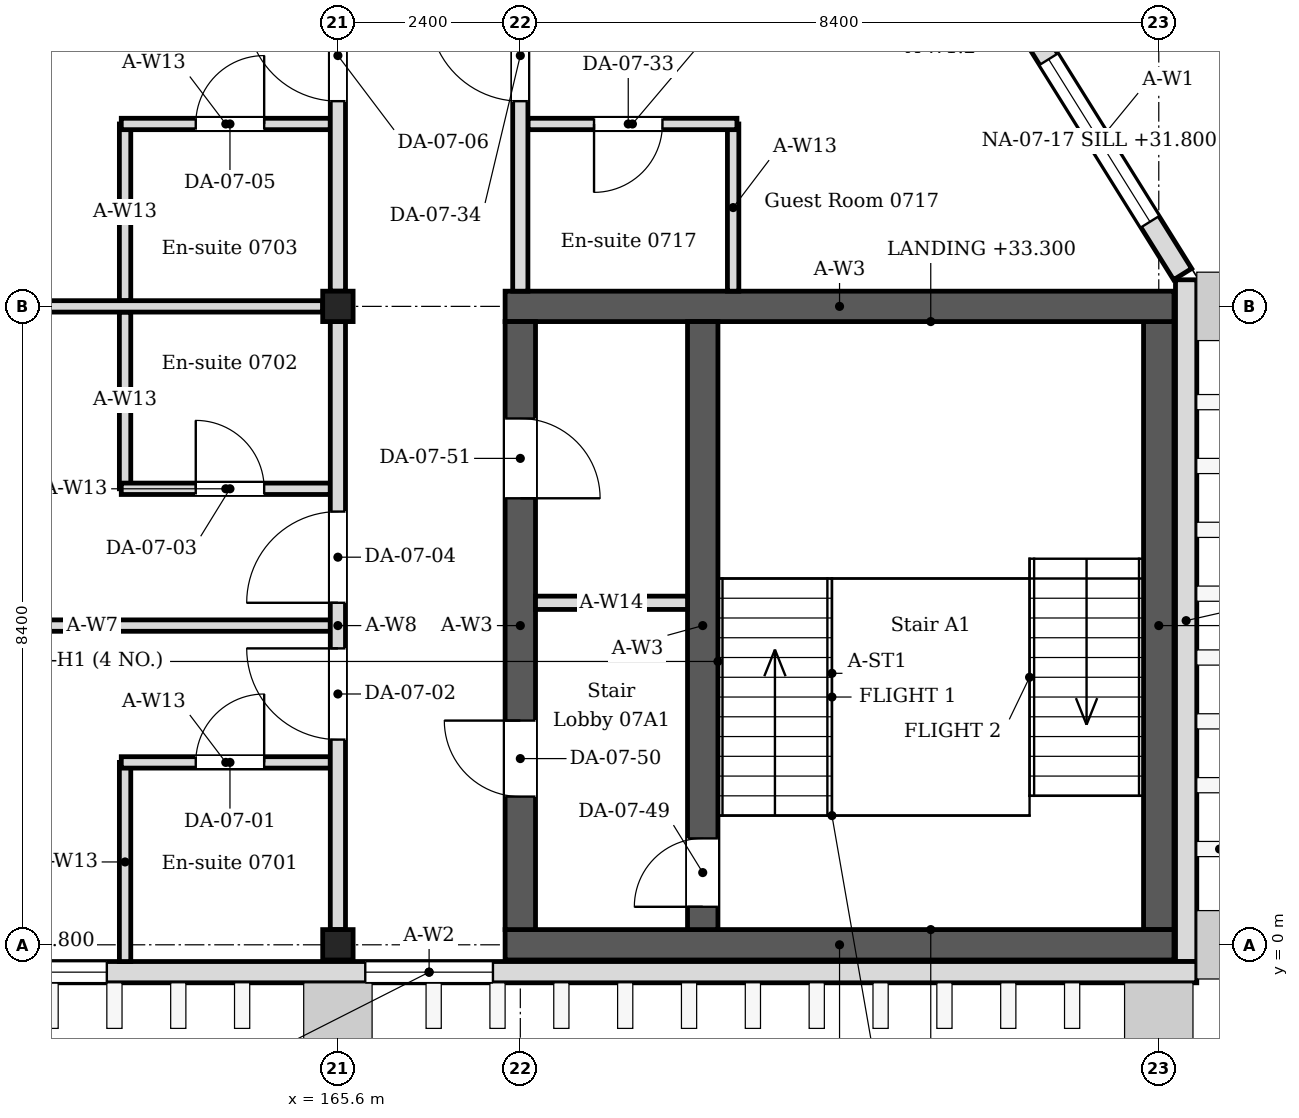
"""IFC4 building model, lengths in metres.
Left out: names, types, materials, properties, quantities, classifications, styles, units other than length and angle.
Written with IfcOpenShell. Run it as: python <this file> out.ifc"""

import sys

from ifc_helpers import new_model, si_unit, direction, frame, frame_2d, origin, origin_2d, place, context, subcontext, project, spatial, rectangle, i_section, extrude, element, fill, save


model = new_model("IFC4")
c1 = context("Model", 3, precision=1e-05, world=origin(), true_north=direction((0.0, 1.0)))
c2 = subcontext(c1, "Body", "Model", "MODEL_VIEW")
j1 = project(units=[si_unit("LENGTHUNIT", "METRE"), si_unit("PLANEANGLEUNIT", "RADIAN")], contexts=[c1])
p1 = place(None, origin())
s1 = spatial("IfcSite", under=j1, at=p1, CompositionType="ELEMENT")
p2 = place(p1, origin())
s2 = spatial("IfcBuilding", under=s1, at=p2, CompositionType="ELEMENT")
p3 = place(p2, frame((0.0, 0.0, 31.2)))
s3 = spatial("IfcBuildingStorey", under=s2, at=p3, CompositionType="ELEMENT", Elevation=31.2)
for number, where, z_axis, x_axis in (
    (1, (165.6, 0.0, 0.0), (0.0, 0.0, 1.0), (1.0, 0.0, 0.0)),
    (2, (165.6, 8.4, 0.0), (0.0, 0.0, 1.0), (1.0, 0.0, 0.0)),
):
    element("IfcColumn", number, at=place(p3, frame(where, z_axis=z_axis, x_axis=x_axis)), inside=s3, PredefinedType="COLUMN", context=c2, shape_type="SweptSolid", body=[
        extrude(i_section(OverallWidth=0.4, OverallDepth=0.4, WebThickness=0.013, FlangeThickness=0.021, FilletRadius=0.022, at=origin_2d()), origin(), (0.0, 0.0, 1.0), 4.2),
    ])
for number, where, z_axis, x_axis in (
    (3, (167.8, 0.0, 0.0), (0.0, 0.0, 1.0), (1.0, 0.0, 0.0)),
    (4, (167.8, 8.4, 0.0), (0.0, 0.0, 1.0), (1.0, 0.0, 0.0)),
):
    element("IfcWall", number, at=place(p3, frame(where, z_axis=z_axis, x_axis=x_axis)), inside=s3, PredefinedType="SOLIDWALL", context=c2, shape_type="SweptSolid", body=[
        extrude(rectangle(XDim=8.8, YDim=0.4, at=frame_2d((4.4, 0.0))), origin(), (0.0, 0.0, 1.0), 4.05),
    ])
p4 = place(p3, frame((168.0, 0.2, 0.0), z_axis=(0.0, 0.0, 1.0), x_axis=(0.0, 1.0, 0.0)))
e5 = element("IfcWall", 5, at=p4, inside=s3, PredefinedType="SOLIDWALL", context=c2, shape_type="SweptSolid", body=[
    extrude(rectangle(XDim=8.0, YDim=0.4, at=frame_2d((4.0, 0.0))), origin(), (0.0, 0.0, 1.0), 4.05),
])
p5 = place(p4, frame((1.75, 0.0, 0.0)))
e6 = element("IfcOpeningElement", 6, at=p5, cuts=e5, PredefinedType="OPENING", context=c2, shape_type="SweptSolid", body=[
    extrude(rectangle(XDim=1.0, YDim=2.1, at=frame_2d((0.5, 1.05))), frame((0.0, 0.21, 0.0), z_axis=(0.0, -1.0, 0.0), x_axis=(1.0, 0.0, 0.0)), (0.0, 0.0, 1.0), 0.42),
])
p6 = place(p4, frame((5.675, 0.0, 0.0)))
e7 = element("IfcOpeningElement", 7, at=p6, cuts=e5, PredefinedType="OPENING", context=c2, shape_type="SweptSolid", body=[
    extrude(rectangle(XDim=1.05, YDim=2.1, at=frame_2d((0.525, 1.05))), frame((0.0, 0.21, 0.0), z_axis=(0.0, -1.0, 0.0), x_axis=(1.0, 0.0, 0.0)), (0.0, 0.0, 1.0), 0.42),
])
p7 = place(p3, frame((176.4, 0.2, 0.0), z_axis=(0.0, 0.0, 1.0), x_axis=(0.0, 1.0, 0.0)))
e8 = element("IfcWall", 8, at=p7, inside=s3, PredefinedType="SOLIDWALL", context=c2, shape_type="SweptSolid", body=[
    extrude(rectangle(XDim=8.0, YDim=0.4, at=frame_2d((4.0, 0.0))), origin(), (0.0, 0.0, 1.0), 4.05),
])
p8 = place(p3, frame((176.76, -0.22, 0.0), z_axis=(0.0, 0.0, 1.0), x_axis=(0.0, 1.0, 0.0)))
e9 = element("IfcWall", 9, at=p8, inside=s3, PredefinedType="SOLIDWALL", context=c2, shape_type="SweptSolid", body=[
    extrude(rectangle(XDim=8.97, YDim=0.28, at=frame_2d((4.485, 0.0))), origin(), (0.0, 0.0, 1.0), 4.05),
])
p9 = place(p3, frame((176.714, 8.824, 0.0), z_axis=(0.0, 0.0, 1.0), x_axis=(-0.529018946142, 0.848610013271, 0.0)))
e10 = element("IfcWall", 10, at=p9, inside=s3, PredefinedType="SOLIDWALL", context=c2, shape_type="SweptSolid", body=[
    extrude(rectangle(XDim=4.144, YDim=0.28, at=frame_2d((2.072, 0.0))), origin(), (0.0, 0.0, 1.0), 4.05),
])
p10 = place(p9, frame((0.812, 0.0, 0.6)))
e11 = element("IfcOpeningElement", 11, at=p10, cuts=e10, PredefinedType="OPENING", context=c2, shape_type="SweptSolid", body=[
    extrude(rectangle(XDim=2.52, YDim=2.4, at=frame_2d((1.26, 1.2))), frame((0.0, 0.15, 0.0), z_axis=(0.0, -1.0, 0.0), x_axis=(1.0, 0.0, 0.0)), (0.0, 0.0, 1.0), 0.3),
])
p11 = place(p3, frame((156.7, -0.36, 0.0), z_axis=(0.0, 0.0, 1.0), x_axis=(1.0, 0.0, 0.0)))
e12 = element("IfcWall", 12, at=p11, inside=s3, PredefinedType="SOLIDWALL", context=c2, shape_type="SweptSolid", body=[
    extrude(rectangle(XDim=20.2, YDim=0.28, at=frame_2d((10.1, 0.0))), origin(), (0.0, 0.0, 1.0), 4.05),
])
p12 = place(p11, frame((9.26, 0.0, 0.6)))
e13 = element("IfcOpeningElement", 13, at=p12, cuts=e12, PredefinedType="OPENING", context=c2, shape_type="SweptSolid", body=[
    extrude(rectangle(XDim=1.68, YDim=2.4, at=frame_2d((0.84, 1.2))), frame((0.0, 0.15, 0.0), z_axis=(0.0, -1.0, 0.0), x_axis=(1.0, 0.0, 0.0)), (0.0, 0.0, 1.0), 0.3),
])
p13 = place(p11, frame((3.34, 0.0, 0.6)))
e14 = element("IfcOpeningElement", 14, at=p13, cuts=e12, PredefinedType="OPENING", context=c2, shape_type="SweptSolid", body=[
    extrude(rectangle(XDim=2.52, YDim=2.4, at=frame_2d((1.26, 1.2))), frame((0.0, 0.15, 0.0), z_axis=(0.0, -1.0, 0.0), x_axis=(1.0, 0.0, 0.0)), (0.0, 0.0, 1.0), 0.3),
])
p14 = place(p3, frame((162.8, -0.22, 0.0), z_axis=(0.0, 0.0, 1.0), x_axis=(0.0, 1.0, 0.0)))
e15 = element("IfcWall", 15, at=p14, inside=s3, PredefinedType="PARTITIONING", context=c2, shape_type="SweptSolid", body=[
    extrude(rectangle(XDim=2.62, YDim=0.15, at=frame_2d((1.31, 0.0))), origin(), (0.0, 0.0, 1.0), 4.05),
])
p15 = place(p3, frame((162.75, 2.4, 0.0), z_axis=(0.0, 0.0, 1.0), x_axis=(1.0, 0.0, 0.0)))
e16 = element("IfcWall", 16, at=p15, inside=s3, PredefinedType="PARTITIONING", context=c2, shape_type="SweptSolid", body=[
    extrude(rectangle(XDim=2.75, YDim=0.15, at=frame_2d((1.375, 0.0))), origin(), (0.0, 0.0, 1.0), 4.05),
])
p16 = place(p15, frame((0.98, 0.0, 0.0)))
e17 = element("IfcOpeningElement", 17, at=p16, cuts=e16, PredefinedType="OPENING", context=c2, shape_type="SweptSolid", body=[
    extrude(rectangle(XDim=0.9, YDim=2.1, at=frame_2d((0.45, 1.05))), frame((0.0, 0.085, 0.0), z_axis=(0.0, -1.0, 0.0), x_axis=(1.0, 0.0, 0.0)), (0.0, 0.0, 1.0), 0.17),
])
p17 = place(p3, frame((162.8, 6.0, 0.0), z_axis=(0.0, 0.0, 1.0), x_axis=(0.0, 1.0, 0.0)))
e18 = element("IfcWall", 18, at=p17, inside=s3, PredefinedType="PARTITIONING", context=c2, shape_type="SweptSolid", body=[
    extrude(rectangle(XDim=2.325, YDim=0.15, at=frame_2d((1.163, 0.0))), origin(), (0.0, 0.0, 1.0), 4.05),
])
p18 = place(p3, frame((162.75, 6.0, 0.0), z_axis=(0.0, 0.0, 1.0), x_axis=(1.0, 0.0, 0.0)))
e19 = element("IfcWall", 19, at=p18, inside=s3, PredefinedType="PARTITIONING", context=c2, shape_type="SweptSolid", body=[
    extrude(rectangle(XDim=2.75, YDim=0.15, at=frame_2d((1.375, 0.0))), origin(), (0.0, 0.0, 1.0), 4.05),
])
p19 = place(p18, frame((0.98, 0.0, 0.0)))
e20 = element("IfcOpeningElement", 20, at=p19, cuts=e19, PredefinedType="OPENING", context=c2, shape_type="SweptSolid", body=[
    extrude(rectangle(XDim=0.9, YDim=2.1, at=frame_2d((0.45, 1.05))), frame((0.0, 0.085, 0.0), z_axis=(0.0, -1.0, 0.0), x_axis=(1.0, 0.0, 0.0)), (0.0, 0.0, 1.0), 0.17),
])
p20 = place(p3, frame((162.8, 8.475, 0.0), z_axis=(0.0, 0.0, 1.0), x_axis=(0.0, 1.0, 0.0)))
e21 = element("IfcWall", 21, at=p20, inside=s3, PredefinedType="PARTITIONING", context=c2, shape_type="SweptSolid", body=[
    extrude(rectangle(XDim=2.325, YDim=0.15, at=frame_2d((1.163, 0.0))), origin(), (0.0, 0.0, 1.0), 4.05),
])
p21 = place(p3, frame((162.75, 10.8, 0.0), z_axis=(0.0, 0.0, 1.0), x_axis=(1.0, 0.0, 0.0)))
e22 = element("IfcWall", 22, at=p21, inside=s3, PredefinedType="PARTITIONING", context=c2, shape_type="SweptSolid", body=[
    extrude(rectangle(XDim=2.75, YDim=0.15, at=frame_2d((1.375, 0.0))), origin(), (0.0, 0.0, 1.0), 4.05),
])
p22 = place(p21, frame((0.98, 0.0, 0.0)))
e23 = element("IfcOpeningElement", 23, at=p22, cuts=e22, PredefinedType="OPENING", context=c2, shape_type="SweptSolid", body=[
    extrude(rectangle(XDim=0.9, YDim=2.1, at=frame_2d((0.45, 1.05))), frame((0.0, 0.085, 0.0), z_axis=(0.0, -1.0, 0.0), x_axis=(1.0, 0.0, 0.0)), (0.0, 0.0, 1.0), 0.17),
])
p23 = place(p3, frame((170.8, 8.6, 0.0), z_axis=(0.0, 0.0, 1.0), x_axis=(0.0, 1.0, 0.0)))
e24 = element("IfcWall", 24, at=p23, inside=s3, PredefinedType="PARTITIONING", context=c2, shape_type="SweptSolid", body=[
    extrude(rectangle(XDim=2.2, YDim=0.15, at=frame_2d((1.1, 0.0))), origin(), (0.0, 0.0, 1.0), 4.05),
])
p24 = place(p3, frame((170.85, 10.8, 0.0), z_axis=(0.0, 0.0, 1.0), x_axis=(-1.0, 0.0, 0.0)))
e25 = element("IfcWall", 25, at=p24, inside=s3, PredefinedType="PARTITIONING", context=c2, shape_type="SweptSolid", body=[
    extrude(rectangle(XDim=2.75, YDim=0.15, at=frame_2d((1.375, 0.0))), origin(), (0.0, 0.0, 1.0), 4.05),
])
p25 = place(p24, frame((0.98, 0.0, 0.0)))
e26 = element("IfcOpeningElement", 26, at=p25, cuts=e25, PredefinedType="OPENING", context=c2, shape_type="SweptSolid", body=[
    extrude(rectangle(XDim=0.9, YDim=2.1, at=frame_2d((0.45, 1.05))), frame((0.0, 0.085, 0.0), z_axis=(0.0, -1.0, 0.0), x_axis=(1.0, 0.0, 0.0)), (0.0, 0.0, 1.0), 0.17),
])
p26 = place(p3, frame((157.4, 8.4, 0.0), z_axis=(0.0, 0.0, 1.0), x_axis=(1.0, 0.0, 0.0)))
e27 = element("IfcWall", 27, at=p26, inside=s3, PredefinedType="PARTITIONING", context=c2, shape_type="SweptSolid", body=[
    extrude(rectangle(XDim=8.0, YDim=0.15, at=frame_2d((4.0, 0.0))), origin(), (0.0, 0.0, 1.0), 3.604),
])
p27 = place(p3, frame((159.24, 4.2, 0.0), z_axis=(0.0, 0.0, 1.0), x_axis=(1.0, 0.0, 0.0)))
e28 = element("IfcWall", 28, at=p27, inside=s3, PredefinedType="PARTITIONING", context=c2, shape_type="SweptSolid", body=[
    extrude(rectangle(XDim=6.26, YDim=0.15, at=frame_2d((3.13, 0.0))), origin(), (0.0, 0.0, 1.0), 3.604),
])
p28 = place(p3, frame((165.6, 0.2, 0.0), z_axis=(0.0, 0.0, 1.0), x_axis=(0.0, 1.0, 0.0)))
e29 = element("IfcWall", 29, at=p28, inside=s3, PredefinedType="PARTITIONING", context=c2, shape_type="SweptSolid", body=[
    extrude(rectangle(XDim=8.0, YDim=0.2, at=frame_2d((4.0, 0.0))), origin(), (0.0, 0.0, 1.0), 3.45),
])
p29 = place(p28, frame((2.5, 0.0, 0.0)))
e30 = element("IfcOpeningElement", 30, at=p29, cuts=e29, PredefinedType="OPENING", context=c2, shape_type="SweptSolid", body=[
    extrude(rectangle(XDim=1.2, YDim=2.1, at=frame_2d((0.6, 1.05))), frame((0.0, 0.11, 0.0), z_axis=(0.0, -1.0, 0.0), x_axis=(1.0, 0.0, 0.0)), (0.0, 0.0, 1.0), 0.22),
])
p30 = place(p28, frame((4.3, 0.0, 0.0)))
e31 = element("IfcOpeningElement", 31, at=p30, cuts=e29, PredefinedType="OPENING", context=c2, shape_type="SweptSolid", body=[
    extrude(rectangle(XDim=1.2, YDim=2.1, at=frame_2d((0.6, 1.05))), frame((0.0, 0.11, 0.0), z_axis=(0.0, -1.0, 0.0), x_axis=(1.0, 0.0, 0.0)), (0.0, 0.0, 1.0), 0.22),
])
p31 = place(p3, frame((165.6, 8.6, 0.0), z_axis=(0.0, 0.0, 1.0), x_axis=(0.0, 1.0, 0.0)))
e32 = element("IfcWall", 32, at=p31, inside=s3, PredefinedType="PARTITIONING", context=c2, shape_type="SweptSolid", body=[
    extrude(rectangle(XDim=8.0, YDim=0.2, at=frame_2d((4.0, 0.0))), origin(), (0.0, 0.0, 1.0), 3.45),
])
p32 = place(p31, frame((2.5, 0.0, 0.0)))
e33 = element("IfcOpeningElement", 33, at=p32, cuts=e32, PredefinedType="OPENING", context=c2, shape_type="SweptSolid", body=[
    extrude(rectangle(XDim=1.2, YDim=2.1, at=frame_2d((0.6, 1.05))), frame((0.0, 0.11, 0.0), z_axis=(0.0, -1.0, 0.0), x_axis=(1.0, 0.0, 0.0)), (0.0, 0.0, 1.0), 0.22),
])
p33 = place(p31, frame((4.3, 0.0, 0.0)))
e34 = element("IfcOpeningElement", 34, at=p33, cuts=e32, PredefinedType="OPENING", context=c2, shape_type="SweptSolid", body=[
    extrude(rectangle(XDim=1.2, YDim=2.1, at=frame_2d((0.6, 1.05))), frame((0.0, 0.11, 0.0), z_axis=(0.0, -1.0, 0.0), x_axis=(1.0, 0.0, 0.0)), (0.0, 0.0, 1.0), 0.22),
])
p34 = place(p3, frame((168.0, 8.6, 0.0), z_axis=(0.0, 0.0, 1.0), x_axis=(0.0, 1.0, 0.0)))
e35 = element("IfcWall", 35, at=p34, inside=s3, PredefinedType="PARTITIONING", context=c2, shape_type="SweptSolid", body=[
    extrude(rectangle(XDim=8.0, YDim=0.2, at=frame_2d((4.0, 0.0))), origin(), (0.0, 0.0, 1.0), 3.45),
])
p35 = place(p34, frame((2.5, 0.0, 0.0)))
e36 = element("IfcOpeningElement", 36, at=p35, cuts=e35, PredefinedType="OPENING", context=c2, shape_type="SweptSolid", body=[
    extrude(rectangle(XDim=1.2, YDim=2.1, at=frame_2d((0.6, 1.05))), frame((0.0, 0.11, 0.0), z_axis=(0.0, -1.0, 0.0), x_axis=(1.0, 0.0, 0.0)), (0.0, 0.0, 1.0), 0.22),
])
p36 = place(p34, frame((4.3, 0.0, 0.0)))
e37 = element("IfcOpeningElement", 37, at=p36, cuts=e35, PredefinedType="OPENING", context=c2, shape_type="SweptSolid", body=[
    extrude(rectangle(XDim=1.2, YDim=2.1, at=frame_2d((0.6, 1.05))), frame((0.0, 0.11, 0.0), z_axis=(0.0, -1.0, 0.0), x_axis=(1.0, 0.0, 0.0)), (0.0, 0.0, 1.0), 0.22),
])
p37 = place(p3, frame((170.4, 0.2, 0.0), z_axis=(0.0, 0.0, 1.0), x_axis=(0.0, 1.0, 0.0)))
e38 = element("IfcWall", 38, at=p37, inside=s3, PredefinedType="SOLIDWALL", context=c2, shape_type="SweptSolid", body=[
    extrude(rectangle(XDim=8.0, YDim=0.4, at=frame_2d((4.0, 0.0))), origin(), (0.0, 0.0, 1.0), 4.05),
])
p38 = place(p37, frame((0.3, 0.0, 0.0)))
e39 = element("IfcOpeningElement", 39, at=p38, cuts=e38, PredefinedType="OPENING", context=c2, shape_type="SweptSolid", body=[
    extrude(rectangle(XDim=0.9, YDim=2.1, at=frame_2d((0.45, 1.05))), frame((0.0, 0.21, 0.0), z_axis=(0.0, -1.0, 0.0), x_axis=(1.0, 0.0, 0.0)), (0.0, 0.0, 1.0), 0.42),
])
p39 = place(p3, frame((168.2, 4.5, 0.0), z_axis=(0.0, 0.0, 1.0), x_axis=(1.0, 0.0, 0.0)))
e40 = element("IfcWall", 40, at=p39, inside=s3, PredefinedType="PARTITIONING", context=c2, shape_type="SweptSolid", body=[
    extrude(rectangle(XDim=2.0, YDim=0.175, at=frame_2d((1.0, 0.0))), origin(), (0.0, 0.0, 1.0), 4.05),
])
p40 = place(p10, origin())
e41 = element("IfcWindow", 41, at=p40, inside=s3, PartitioningType="SINGLE_PANEL", PredefinedType="WINDOW", context=c2, shape_type="SweptSolid", body=[
    extrude(rectangle(XDim=2.52, YDim=2.4, at=frame_2d((1.26, 1.2))), frame((0.0, 0.03, 0.0), z_axis=(0.0, -1.0, 0.0), x_axis=(1.0, 0.0, 0.0)), (0.0, 0.0, 1.0), 0.06),
])
fill(e11, e41)
p41 = place(p12, origin())
e42 = element("IfcWindow", 42, at=p41, inside=s3, PartitioningType="SINGLE_PANEL", PredefinedType="WINDOW", context=c2, shape_type="SweptSolid", body=[
    extrude(rectangle(XDim=1.68, YDim=2.4, at=frame_2d((0.84, 1.2))), frame((0.0, 0.03, 0.0), z_axis=(0.0, -1.0, 0.0), x_axis=(1.0, 0.0, 0.0)), (0.0, 0.0, 1.0), 0.06),
])
fill(e13, e42)
p42 = place(p13, origin())
e43 = element("IfcWindow", 43, at=p42, inside=s3, PartitioningType="SINGLE_PANEL", PredefinedType="WINDOW", context=c2, shape_type="SweptSolid", body=[
    extrude(rectangle(XDim=2.52, YDim=2.4, at=frame_2d((1.26, 1.2))), frame((0.0, 0.03, 0.0), z_axis=(0.0, -1.0, 0.0), x_axis=(1.0, 0.0, 0.0)), (0.0, 0.0, 1.0), 0.06),
])
fill(e14, e43)
p43 = place(p16, origin())
e44 = element("IfcDoor", 44, at=p43, inside=s3, OperationType="SINGLE_SWING_RIGHT", PredefinedType="DOOR", context=c2, shape_type="SweptSolid", body=[
    extrude(rectangle(XDim=0.9, YDim=2.1, at=frame_2d((0.45, 1.05))), frame((0.0, 0.025, 0.0), z_axis=(0.0, -1.0, 0.0), x_axis=(1.0, 0.0, 0.0)), (0.0, 0.0, 1.0), 0.05),
])
fill(e17, e44)
p44 = place(p29, origin())
e45 = element("IfcDoor", 45, at=p44, inside=s3, OperationType="SINGLE_SWING_RIGHT", PredefinedType="DOOR", context=c2, shape_type="SweptSolid", body=[
    extrude(rectangle(XDim=1.2, YDim=2.1, at=frame_2d((0.6, 1.05))), frame((0.0, 0.025, 0.0), z_axis=(0.0, -1.0, 0.0), x_axis=(1.0, 0.0, 0.0)), (0.0, 0.0, 1.0), 0.05),
])
fill(e30, e45)
p45 = place(p19, origin())
e46 = element("IfcDoor", 46, at=p45, inside=s3, OperationType="SINGLE_SWING_LEFT", PredefinedType="DOOR", context=c2, shape_type="SweptSolid", body=[
    extrude(rectangle(XDim=0.9, YDim=2.1, at=frame_2d((0.45, 1.05))), frame((0.0, 0.025, 0.0), z_axis=(0.0, -1.0, 0.0), x_axis=(1.0, 0.0, 0.0)), (0.0, 0.0, 1.0), 0.05),
])
fill(e20, e46)
p46 = place(p30, origin())
e47 = element("IfcDoor", 47, at=p46, inside=s3, OperationType="SINGLE_SWING_LEFT", PredefinedType="DOOR", context=c2, shape_type="SweptSolid", body=[
    extrude(rectangle(XDim=1.2, YDim=2.1, at=frame_2d((0.6, 1.05))), frame((0.0, 0.025, 0.0), z_axis=(0.0, -1.0, 0.0), x_axis=(1.0, 0.0, 0.0)), (0.0, 0.0, 1.0), 0.05),
])
fill(e31, e47)
p47 = place(p22, origin())
e48 = element("IfcDoor", 48, at=p47, inside=s3, OperationType="SINGLE_SWING_RIGHT", PredefinedType="DOOR", context=c2, shape_type="SweptSolid", body=[
    extrude(rectangle(XDim=0.9, YDim=2.1, at=frame_2d((0.45, 1.05))), frame((0.0, 0.025, 0.0), z_axis=(0.0, -1.0, 0.0), x_axis=(1.0, 0.0, 0.0)), (0.0, 0.0, 1.0), 0.05),
])
fill(e23, e48)
p48 = place(p32, origin())
e49 = element("IfcDoor", 49, at=p48, inside=s3, OperationType="SINGLE_SWING_RIGHT", PredefinedType="DOOR", context=c2, shape_type="SweptSolid", body=[
    extrude(rectangle(XDim=1.2, YDim=2.1, at=frame_2d((0.6, 1.05))), frame((0.0, 0.025, 0.0), z_axis=(0.0, -1.0, 0.0), x_axis=(1.0, 0.0, 0.0)), (0.0, 0.0, 1.0), 0.05),
])
fill(e33, e49)
p49 = place(p25, origin())
e50 = element("IfcDoor", 50, at=p49, inside=s3, OperationType="SINGLE_SWING_RIGHT", PredefinedType="DOOR", context=c2, shape_type="SweptSolid", body=[
    extrude(rectangle(XDim=0.9, YDim=2.1, at=frame_2d((0.45, 1.05))), frame((0.0, 0.025, 0.0), z_axis=(0.0, -1.0, 0.0), x_axis=(1.0, 0.0, 0.0)), (0.0, 0.0, 1.0), 0.05),
])
fill(e26, e50)
p50 = place(p35, origin())
e51 = element("IfcDoor", 51, at=p50, inside=s3, OperationType="SINGLE_SWING_RIGHT", PredefinedType="DOOR", context=c2, shape_type="SweptSolid", body=[
    extrude(rectangle(XDim=1.2, YDim=2.1, at=frame_2d((0.6, 1.05))), frame((0.0, 0.025, 0.0), z_axis=(0.0, -1.0, 0.0), x_axis=(1.0, 0.0, 0.0)), (0.0, 0.0, 1.0), 0.05),
])
fill(e36, e51)
p51 = place(p38, origin())
e52 = element("IfcDoor", 52, at=p51, inside=s3, OperationType="SINGLE_SWING_LEFT", PredefinedType="DOOR", context=c2, shape_type="SweptSolid", body=[
    extrude(rectangle(XDim=0.9, YDim=2.1, at=frame_2d((0.45, 1.05))), frame((0.0, 0.025, 0.0), z_axis=(0.0, -1.0, 0.0), x_axis=(1.0, 0.0, 0.0)), (0.0, 0.0, 1.0), 0.05),
])
fill(e39, e52)
p52 = place(p5, origin())
e53 = element("IfcDoor", 53, at=p52, inside=s3, OperationType="SINGLE_SWING_RIGHT", PredefinedType="DOOR", context=c2, shape_type="SweptSolid", body=[
    extrude(rectangle(XDim=1.0, YDim=2.1, at=frame_2d((0.5, 1.05))), frame((0.0, 0.025, 0.0), z_axis=(0.0, -1.0, 0.0), x_axis=(1.0, 0.0, 0.0)), (0.0, 0.0, 1.0), 0.05),
])
fill(e6, e53)
p53 = place(p6, origin())
e54 = element("IfcDoor", 54, at=p53, inside=s3, OperationType="SINGLE_SWING_LEFT", PredefinedType="DOOR", context=c2, shape_type="SweptSolid", body=[
    extrude(rectangle(XDim=1.05, YDim=2.1, at=frame_2d((0.525, 1.05))), frame((0.0, 0.025, 0.0), z_axis=(0.0, -1.0, 0.0), x_axis=(1.0, 0.0, 0.0)), (0.0, 0.0, 1.0), 0.05),
])
fill(e7, e54)
save(model, sys.argv[1])
